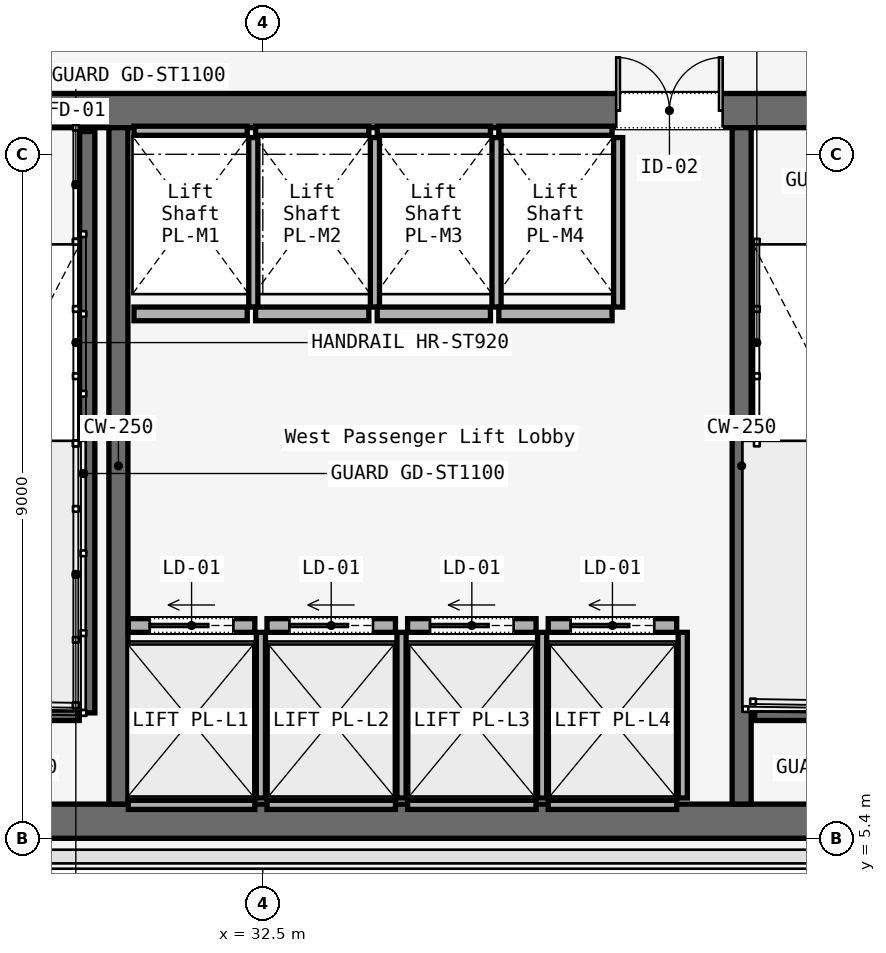
"""IFC4 building model, lengths in metres.
Left out: names, types, materials, properties, quantities, classifications, styles, units other than length and angle.
Written with IfcOpenShell. Run it as: python <this file> out.ifc"""

import sys

from ifc_helpers import new_model, si_unit, direction, frame, frame_2d, origin, place, context, subcontext, project, spatial, rectangle, extrude, element, fill, save


model = new_model("IFC4")
c1 = context("Model", 3, precision=1e-05, world=origin(), true_north=direction((0.0, 1.0)))
c2 = subcontext(c1, "Body", "Model", "MODEL_VIEW")
j1 = project(units=[si_unit("LENGTHUNIT", "METRE"), si_unit("PLANEANGLEUNIT", "RADIAN")], contexts=[c1])
p1 = place(None, origin())
s1 = spatial("IfcSite", under=j1, at=p1, CompositionType="ELEMENT")
p2 = place(p1, origin())
s2 = spatial("IfcBuilding", under=s1, at=p2, CompositionType="ELEMENT")
p3 = place(p2, frame((0.0, 0.0, 100.6)))
s3 = spatial("IfcBuildingStorey", under=s2, at=p3, CompositionType="ELEMENT", Elevation=100.6)
p4 = place(p3, frame((26.45, 14.975, 0.0), z_axis=(0.0, 0.0, 1.0), x_axis=(1.0, 0.0, 0.0)))
e1 = element("IfcWall", 1, at=p4, inside=s3, PredefinedType="SOLIDWALL", context=c2, shape_type="SweptSolid", body=[
    extrude(rectangle(XDim=31.1, YDim=0.45, at=frame_2d((15.55, 0.0))), origin(), (0.0, 0.0, 1.0), 3.58),
])
p5 = place(p4, frame((1.65, 0.0, 0.0)))
e2 = element("IfcOpeningElement", 2, at=p5, cuts=e1, PredefinedType="OPENING", context=c2, shape_type="SweptSolid", body=[
    extrude(rectangle(XDim=1.1, YDim=2.2, at=frame_2d((0.55, 1.1))), frame((0.0, 0.225, 0.0), z_axis=(0.0, -1.0, 0.0), x_axis=(1.0, 0.0, 0.0)), (0.0, 0.0, 1.0), 0.45),
])
p6 = place(p4, frame((13.65, 0.0, 0.0)))
e3 = element("IfcOpeningElement", 3, at=p6, cuts=e1, PredefinedType="OPENING", context=c2, shape_type="SweptSolid", body=[
    extrude(rectangle(XDim=1.1, YDim=2.2, at=frame_2d((0.55, 1.1))), frame((0.0, 0.225, 0.0), z_axis=(0.0, -1.0, 0.0), x_axis=(1.0, 0.0, 0.0)), (0.0, 0.0, 1.0), 0.45),
])
p7 = place(p4, frame((25.55, 0.0, 0.0)))
e4 = element("IfcOpeningElement", 4, at=p7, cuts=e1, PredefinedType="OPENING", context=c2, shape_type="SweptSolid", body=[
    extrude(rectangle(XDim=1.1, YDim=2.2, at=frame_2d((0.55, 1.1))), frame((0.0, 0.225, 0.0), z_axis=(0.0, -1.0, 0.0), x_axis=(1.0, 0.0, 0.0)), (0.0, 0.0, 1.0), 0.45),
])
p8 = place(p4, frame((10.7, 0.0, 0.0)))
e5 = element("IfcOpeningElement", 5, at=p8, cuts=e1, PredefinedType="OPENING", context=c2, shape_type="SweptSolid", body=[
    extrude(rectangle(XDim=1.4, YDim=2.2, at=frame_2d((0.7, 1.1))), frame((0.0, 0.225, 0.0), z_axis=(0.0, -1.0, 0.0), x_axis=(1.0, 0.0, 0.0)), (0.0, 0.0, 1.0), 0.45),
])
p9 = place(p4, frame((19.35, 0.0, 0.0)))
e6 = element("IfcOpeningElement", 6, at=p9, cuts=e1, PredefinedType="OPENING", context=c2, shape_type="SweptSolid", body=[
    extrude(rectangle(XDim=1.1, YDim=2.2, at=frame_2d((0.55, 1.1))), frame((0.0, 0.225, 0.0), z_axis=(0.0, -1.0, 0.0), x_axis=(1.0, 0.0, 0.0)), (0.0, 0.0, 1.0), 0.45),
])
p10 = place(p4, frame((21.4, 0.0, 0.0)))
e7 = element("IfcOpeningElement", 7, at=p10, cuts=e1, PredefinedType="OPENING", context=c2, shape_type="SweptSolid", body=[
    extrude(rectangle(XDim=0.9, YDim=2.1, at=frame_2d((0.45, 1.05))), frame((0.0, 0.225, 0.0), z_axis=(0.0, -1.0, 0.0), x_axis=(1.0, 0.0, 0.0)), (0.0, 0.0, 1.0), 0.45),
])
p11 = place(p4, frame((23.35, 0.0, 0.0)))
e8 = element("IfcOpeningElement", 8, at=p11, cuts=e1, PredefinedType="OPENING", context=c2, shape_type="SweptSolid", body=[
    extrude(rectangle(XDim=1.3, YDim=2.3, at=frame_2d((0.65, 1.15))), frame((0.0, 0.225, 0.0), z_axis=(0.0, -1.0, 0.0), x_axis=(1.0, 0.0, 0.0)), (0.0, 0.0, 1.0), 0.45),
])
p12 = place(p3, frame((26.45, 5.625, 0.0), z_axis=(0.0, 0.0, 1.0), x_axis=(1.0, 0.0, 0.0)))
e9 = element("IfcWall", 9, at=p12, inside=s3, PredefinedType="SOLIDWALL", context=c2, shape_type="SweptSolid", body=[
    extrude(rectangle(XDim=31.1, YDim=0.45, at=frame_2d((15.55, 0.0))), origin(), (0.0, 0.0, 1.0), 3.58),
])
for number, where, z_axis, x_axis in (
    (10, (30.6, 5.85, 0.0), (0.0, 0.0, 1.0), (0.0, 1.0, 0.0)),
    (11, (38.8, 5.85, 0.0), (0.0, 0.0, 1.0), (0.0, 1.0, 0.0)),
):
    element("IfcWall", number, at=place(p3, frame(where, z_axis=z_axis, x_axis=x_axis)), inside=s3, PredefinedType="SOLIDWALL", context=c2, shape_type="SweptSolid", body=[
        extrude(rectangle(XDim=8.9, YDim=0.25, at=frame_2d((4.45, 0.0))), origin(), (0.0, 0.0, 1.0), 3.58),
    ])
p13 = place(p3, frame((30.19, 14.7, 0.0), z_axis=(0.0, 0.0, 1.0), x_axis=(0.0, -1.0, 0.0)))
e12 = element("IfcWall", 12, at=p13, inside=s3, PredefinedType="SOLIDWALL", context=c2, shape_type="SweptSolid", body=[
    extrude(rectangle(XDim=7.65, YDim=0.2, at=frame_2d((3.825, 0.0))), origin(), (0.0, 0.0, 1.0), 3.8),
])
for number, where, z_axis, x_axis in (
    (13, (26.97, 7.05, 0.0), (0.0, 0.0, 1.0), (1.0, 0.0, 0.0)),
    (14, (38.97, 7.05, 0.0), (0.0, 0.0, 1.0), (1.0, 0.0, 0.0)),
):
    element("IfcWall", number, at=place(p3, frame(where, z_axis=z_axis, x_axis=x_axis)), inside=s3, PredefinedType="SOLIDWALL", context=c2, shape_type="SweptSolid", body=[
        extrude(rectangle(XDim=3.115, YDim=0.2, at=frame_2d((1.558, 0.0))), origin(), (0.0, 0.0, 1.0), 3.8),
    ])
p14 = place(p3, frame((30.73, 8.2, 0.0), z_axis=(0.0, 0.0, 1.0), x_axis=(1.0, 0.0, 0.0)))
e15 = element("IfcWall", 15, at=p14, inside=s3, PredefinedType="SOLIDWALL", context=c2, shape_type="SweptSolid", body=[
    extrude(rectangle(XDim=1.665, YDim=0.18, at=frame_2d((0.833, 0.0))), origin(), (0.0, 0.0, 1.0), 2.95),
])
p15 = place(p14, frame((0.282, 0.0, 0.0)))
e16 = element("IfcOpeningElement", 16, at=p15, cuts=e15, PredefinedType="OPENING", context=c2, shape_type="SweptSolid", body=[
    extrude(rectangle(XDim=1.1, YDim=2.2, at=frame_2d((0.55, 1.1))), frame((0.0, 0.09, 0.0), z_axis=(0.0, -1.0, 0.0), x_axis=(1.0, 0.0, 0.0)), (0.0, 0.0, 1.0), 0.18),
])
p16 = place(p3, frame((30.73, 5.84, 0.0), z_axis=(0.0, 0.0, 1.0), x_axis=(1.0, 0.0, 0.0)))
e17 = element("IfcWall", 17, at=p16, inside=s3, PredefinedType="SOLIDWALL", context=c2, shape_type="SweptSolid", body=[
    extrude(rectangle(XDim=1.665, YDim=0.12, at=frame_2d((0.833, 0.0))), origin(), (0.0, 0.0, 1.0), 2.95),
])
p17 = place(p3, frame((32.475, 5.93, 0.0), z_axis=(0.0, 0.0, 1.0), x_axis=(0.0, 1.0, 0.0)))
e18 = element("IfcWall", 18, at=p17, inside=s3, PredefinedType="SOLIDWALL", context=c2, shape_type="SweptSolid", body=[
    extrude(rectangle(XDim=2.18, YDim=0.12, at=frame_2d((1.09, 0.0))), origin(), (0.0, 0.0, 1.0), 2.95),
])
p18 = place(p3, frame((32.555, 8.2, 0.0), z_axis=(0.0, 0.0, 1.0), x_axis=(1.0, 0.0, 0.0)))
e19 = element("IfcWall", 19, at=p18, inside=s3, PredefinedType="SOLIDWALL", context=c2, shape_type="SweptSolid", body=[
    extrude(rectangle(XDim=1.69, YDim=0.18, at=frame_2d((0.845, 0.0))), origin(), (0.0, 0.0, 1.0), 2.95),
])
p19 = place(p18, frame((0.295, 0.0, 0.0)))
e20 = element("IfcOpeningElement", 20, at=p19, cuts=e19, PredefinedType="OPENING", context=c2, shape_type="SweptSolid", body=[
    extrude(rectangle(XDim=1.1, YDim=2.2, at=frame_2d((0.55, 1.1))), frame((0.0, 0.09, 0.0), z_axis=(0.0, -1.0, 0.0), x_axis=(1.0, 0.0, 0.0)), (0.0, 0.0, 1.0), 0.18),
])
p20 = place(p3, frame((32.555, 5.84, 0.0), z_axis=(0.0, 0.0, 1.0), x_axis=(1.0, 0.0, 0.0)))
e21 = element("IfcWall", 21, at=p20, inside=s3, PredefinedType="SOLIDWALL", context=c2, shape_type="SweptSolid", body=[
    extrude(rectangle(XDim=1.69, YDim=0.12, at=frame_2d((0.845, 0.0))), origin(), (0.0, 0.0, 1.0), 2.95),
])
p21 = place(p3, frame((34.325, 5.93, 0.0), z_axis=(0.0, 0.0, 1.0), x_axis=(0.0, 1.0, 0.0)))
e22 = element("IfcWall", 22, at=p21, inside=s3, PredefinedType="SOLIDWALL", context=c2, shape_type="SweptSolid", body=[
    extrude(rectangle(XDim=2.18, YDim=0.12, at=frame_2d((1.09, 0.0))), origin(), (0.0, 0.0, 1.0), 2.95),
])
p22 = place(p3, frame((34.405, 8.2, 0.0), z_axis=(0.0, 0.0, 1.0), x_axis=(1.0, 0.0, 0.0)))
e23 = element("IfcWall", 23, at=p22, inside=s3, PredefinedType="SOLIDWALL", context=c2, shape_type="SweptSolid", body=[
    extrude(rectangle(XDim=1.69, YDim=0.18, at=frame_2d((0.845, 0.0))), origin(), (0.0, 0.0, 1.0), 2.95),
])
p23 = place(p22, frame((0.295, 0.0, 0.0)))
e24 = element("IfcOpeningElement", 24, at=p23, cuts=e23, PredefinedType="OPENING", context=c2, shape_type="SweptSolid", body=[
    extrude(rectangle(XDim=1.1, YDim=2.2, at=frame_2d((0.55, 1.1))), frame((0.0, 0.09, 0.0), z_axis=(0.0, -1.0, 0.0), x_axis=(1.0, 0.0, 0.0)), (0.0, 0.0, 1.0), 0.18),
])
p24 = place(p3, frame((34.405, 5.84, 0.0), z_axis=(0.0, 0.0, 1.0), x_axis=(1.0, 0.0, 0.0)))
e25 = element("IfcWall", 25, at=p24, inside=s3, PredefinedType="SOLIDWALL", context=c2, shape_type="SweptSolid", body=[
    extrude(rectangle(XDim=1.69, YDim=0.12, at=frame_2d((0.845, 0.0))), origin(), (0.0, 0.0, 1.0), 2.95),
])
p25 = place(p3, frame((36.175, 5.93, 0.0), z_axis=(0.0, 0.0, 1.0), x_axis=(0.0, 1.0, 0.0)))
e26 = element("IfcWall", 26, at=p25, inside=s3, PredefinedType="SOLIDWALL", context=c2, shape_type="SweptSolid", body=[
    extrude(rectangle(XDim=2.18, YDim=0.12, at=frame_2d((1.09, 0.0))), origin(), (0.0, 0.0, 1.0), 2.95),
])
p26 = place(p3, frame((36.255, 8.2, 0.0), z_axis=(0.0, 0.0, 1.0), x_axis=(1.0, 0.0, 0.0)))
e27 = element("IfcWall", 27, at=p26, inside=s3, PredefinedType="SOLIDWALL", context=c2, shape_type="SweptSolid", body=[
    extrude(rectangle(XDim=1.69, YDim=0.18, at=frame_2d((0.845, 0.0))), origin(), (0.0, 0.0, 1.0), 2.95),
])
p27 = place(p26, frame((0.295, 0.0, 0.0)))
e28 = element("IfcOpeningElement", 28, at=p27, cuts=e27, PredefinedType="OPENING", context=c2, shape_type="SweptSolid", body=[
    extrude(rectangle(XDim=1.1, YDim=2.2, at=frame_2d((0.55, 1.1))), frame((0.0, 0.09, 0.0), z_axis=(0.0, -1.0, 0.0), x_axis=(1.0, 0.0, 0.0)), (0.0, 0.0, 1.0), 0.18),
])
p28 = place(p3, frame((36.255, 5.84, 0.0), z_axis=(0.0, 0.0, 1.0), x_axis=(1.0, 0.0, 0.0)))
e29 = element("IfcWall", 29, at=p28, inside=s3, PredefinedType="SOLIDWALL", context=c2, shape_type="SweptSolid", body=[
    extrude(rectangle(XDim=1.69, YDim=0.12, at=frame_2d((0.845, 0.0))), origin(), (0.0, 0.0, 1.0), 2.95),
])
p29 = place(p3, frame((38.025, 5.93, 0.0), z_axis=(0.0, 0.0, 1.0), x_axis=(0.0, 1.0, 0.0)))
e30 = element("IfcWall", 30, at=p29, inside=s3, PredefinedType="SOLIDWALL", context=c2, shape_type="SweptSolid", body=[
    extrude(rectangle(XDim=2.18, YDim=0.12, at=frame_2d((1.09, 0.0))), origin(), (0.0, 0.0, 1.0), 2.95),
])
p30 = place(p3, frame((30.805, 12.3, 0.0), z_axis=(0.0, 0.0, 1.0), x_axis=(1.0, 0.0, 0.0)))
e31 = element("IfcWall", 31, at=p30, inside=s3, PredefinedType="SOLIDWALL", context=c2, shape_type="SweptSolid", body=[
    extrude(rectangle(XDim=1.49, YDim=0.18, at=frame_2d((0.745, 0.0))), origin(), (0.0, 0.0, 1.0), 2.95),
])
p31 = place(p3, frame((30.805, 14.71, 0.0), z_axis=(0.0, 0.0, 1.0), x_axis=(1.0, 0.0, 0.0)))
e32 = element("IfcWall", 32, at=p31, inside=s3, PredefinedType="SOLIDWALL", context=c2, shape_type="SweptSolid", body=[
    extrude(rectangle(XDim=1.49, YDim=0.12, at=frame_2d((0.745, 0.0))), origin(), (0.0, 0.0, 1.0), 2.95),
])
p32 = place(p3, frame((32.375, 12.39, 0.0), z_axis=(0.0, 0.0, 1.0), x_axis=(0.0, 1.0, 0.0)))
e33 = element("IfcWall", 33, at=p32, inside=s3, PredefinedType="SOLIDWALL", context=c2, shape_type="SweptSolid", body=[
    extrude(rectangle(XDim=2.23, YDim=0.12, at=frame_2d((1.115, 0.0))), origin(), (0.0, 0.0, 1.0), 2.95),
])
p33 = place(p3, frame((32.405, 12.3, 0.0), z_axis=(0.0, 0.0, 1.0), x_axis=(1.0, 0.0, 0.0)))
e34 = element("IfcWall", 34, at=p33, inside=s3, PredefinedType="SOLIDWALL", context=c2, shape_type="SweptSolid", body=[
    extrude(rectangle(XDim=1.49, YDim=0.18, at=frame_2d((0.745, 0.0))), origin(), (0.0, 0.0, 1.0), 2.95),
])
p34 = place(p3, frame((32.405, 14.71, 0.0), z_axis=(0.0, 0.0, 1.0), x_axis=(1.0, 0.0, 0.0)))
e35 = element("IfcWall", 35, at=p34, inside=s3, PredefinedType="SOLIDWALL", context=c2, shape_type="SweptSolid", body=[
    extrude(rectangle(XDim=1.49, YDim=0.12, at=frame_2d((0.745, 0.0))), origin(), (0.0, 0.0, 1.0), 2.95),
])
p35 = place(p3, frame((33.975, 12.39, 0.0), z_axis=(0.0, 0.0, 1.0), x_axis=(0.0, 1.0, 0.0)))
e36 = element("IfcWall", 36, at=p35, inside=s3, PredefinedType="SOLIDWALL", context=c2, shape_type="SweptSolid", body=[
    extrude(rectangle(XDim=2.23, YDim=0.12, at=frame_2d((1.115, 0.0))), origin(), (0.0, 0.0, 1.0), 2.95),
])
p36 = place(p3, frame((34.005, 12.3, 0.0), z_axis=(0.0, 0.0, 1.0), x_axis=(1.0, 0.0, 0.0)))
e37 = element("IfcWall", 37, at=p36, inside=s3, PredefinedType="SOLIDWALL", context=c2, shape_type="SweptSolid", body=[
    extrude(rectangle(XDim=1.49, YDim=0.18, at=frame_2d((0.745, 0.0))), origin(), (0.0, 0.0, 1.0), 2.95),
])
p37 = place(p3, frame((34.005, 14.71, 0.0), z_axis=(0.0, 0.0, 1.0), x_axis=(1.0, 0.0, 0.0)))
e38 = element("IfcWall", 38, at=p37, inside=s3, PredefinedType="SOLIDWALL", context=c2, shape_type="SweptSolid", body=[
    extrude(rectangle(XDim=1.49, YDim=0.12, at=frame_2d((0.745, 0.0))), origin(), (0.0, 0.0, 1.0), 2.95),
])
p38 = place(p3, frame((35.575, 12.39, 0.0), z_axis=(0.0, 0.0, 1.0), x_axis=(0.0, 1.0, 0.0)))
e39 = element("IfcWall", 39, at=p38, inside=s3, PredefinedType="SOLIDWALL", context=c2, shape_type="SweptSolid", body=[
    extrude(rectangle(XDim=2.23, YDim=0.12, at=frame_2d((1.115, 0.0))), origin(), (0.0, 0.0, 1.0), 2.95),
])
p39 = place(p3, frame((35.605, 12.3, 0.0), z_axis=(0.0, 0.0, 1.0), x_axis=(1.0, 0.0, 0.0)))
e40 = element("IfcWall", 40, at=p39, inside=s3, PredefinedType="SOLIDWALL", context=c2, shape_type="SweptSolid", body=[
    extrude(rectangle(XDim=1.49, YDim=0.18, at=frame_2d((0.745, 0.0))), origin(), (0.0, 0.0, 1.0), 2.95),
])
p40 = place(p3, frame((35.605, 14.71, 0.0), z_axis=(0.0, 0.0, 1.0), x_axis=(1.0, 0.0, 0.0)))
e41 = element("IfcWall", 41, at=p40, inside=s3, PredefinedType="SOLIDWALL", context=c2, shape_type="SweptSolid", body=[
    extrude(rectangle(XDim=1.49, YDim=0.12, at=frame_2d((0.745, 0.0))), origin(), (0.0, 0.0, 1.0), 2.95),
])
p41 = place(p3, frame((37.175, 12.39, 0.0), z_axis=(0.0, 0.0, 1.0), x_axis=(0.0, 1.0, 0.0)))
e42 = element("IfcWall", 42, at=p41, inside=s3, PredefinedType="SOLIDWALL", context=c2, shape_type="SweptSolid", body=[
    extrude(rectangle(XDim=2.23, YDim=0.12, at=frame_2d((1.115, 0.0))), origin(), (0.0, 0.0, 1.0), 2.95),
])
p42 = place(p8, origin())
e43 = element("IfcDoor", 43, at=p42, inside=s3, OperationType="DOUBLE_DOOR_SINGLE_SWING", PredefinedType="DOOR", context=c2, shape_type="SweptSolid", body=[
    extrude(rectangle(XDim=1.4, YDim=2.2, at=frame_2d((0.7, 1.1))), frame((0.0, 0.025, 0.0), z_axis=(0.0, -1.0, 0.0), x_axis=(1.0, 0.0, 0.0)), (0.0, 0.0, 1.0), 0.05),
])
fill(e5, e43)
p43 = place(p15, origin())
e44 = element("IfcDoor", 44, at=p43, inside=s3, OperationType="SLIDING_TO_LEFT", PredefinedType="DOOR", context=c2, shape_type="SweptSolid", body=[
    extrude(rectangle(XDim=1.1, YDim=2.2, at=frame_2d((0.55, 1.1))), frame((0.0, 0.025, 0.0), z_axis=(0.0, -1.0, 0.0), x_axis=(1.0, 0.0, 0.0)), (0.0, 0.0, 1.0), 0.05),
])
fill(e16, e44)
p44 = place(p19, origin())
e45 = element("IfcDoor", 45, at=p44, inside=s3, OperationType="SLIDING_TO_LEFT", PredefinedType="DOOR", context=c2, shape_type="SweptSolid", body=[
    extrude(rectangle(XDim=1.1, YDim=2.2, at=frame_2d((0.55, 1.1))), frame((0.0, 0.025, 0.0), z_axis=(0.0, -1.0, 0.0), x_axis=(1.0, 0.0, 0.0)), (0.0, 0.0, 1.0), 0.05),
])
fill(e20, e45)
p45 = place(p23, origin())
e46 = element("IfcDoor", 46, at=p45, inside=s3, OperationType="SLIDING_TO_LEFT", PredefinedType="DOOR", context=c2, shape_type="SweptSolid", body=[
    extrude(rectangle(XDim=1.1, YDim=2.2, at=frame_2d((0.55, 1.1))), frame((0.0, 0.025, 0.0), z_axis=(0.0, -1.0, 0.0), x_axis=(1.0, 0.0, 0.0)), (0.0, 0.0, 1.0), 0.05),
])
fill(e24, e46)
p46 = place(p27, origin())
e47 = element("IfcDoor", 47, at=p46, inside=s3, OperationType="SLIDING_TO_LEFT", PredefinedType="DOOR", context=c2, shape_type="SweptSolid", body=[
    extrude(rectangle(XDim=1.1, YDim=2.2, at=frame_2d((0.55, 1.1))), frame((0.0, 0.025, 0.0), z_axis=(0.0, -1.0, 0.0), x_axis=(1.0, 0.0, 0.0)), (0.0, 0.0, 1.0), 0.05),
])
fill(e28, e47)
save(model, sys.argv[1])
